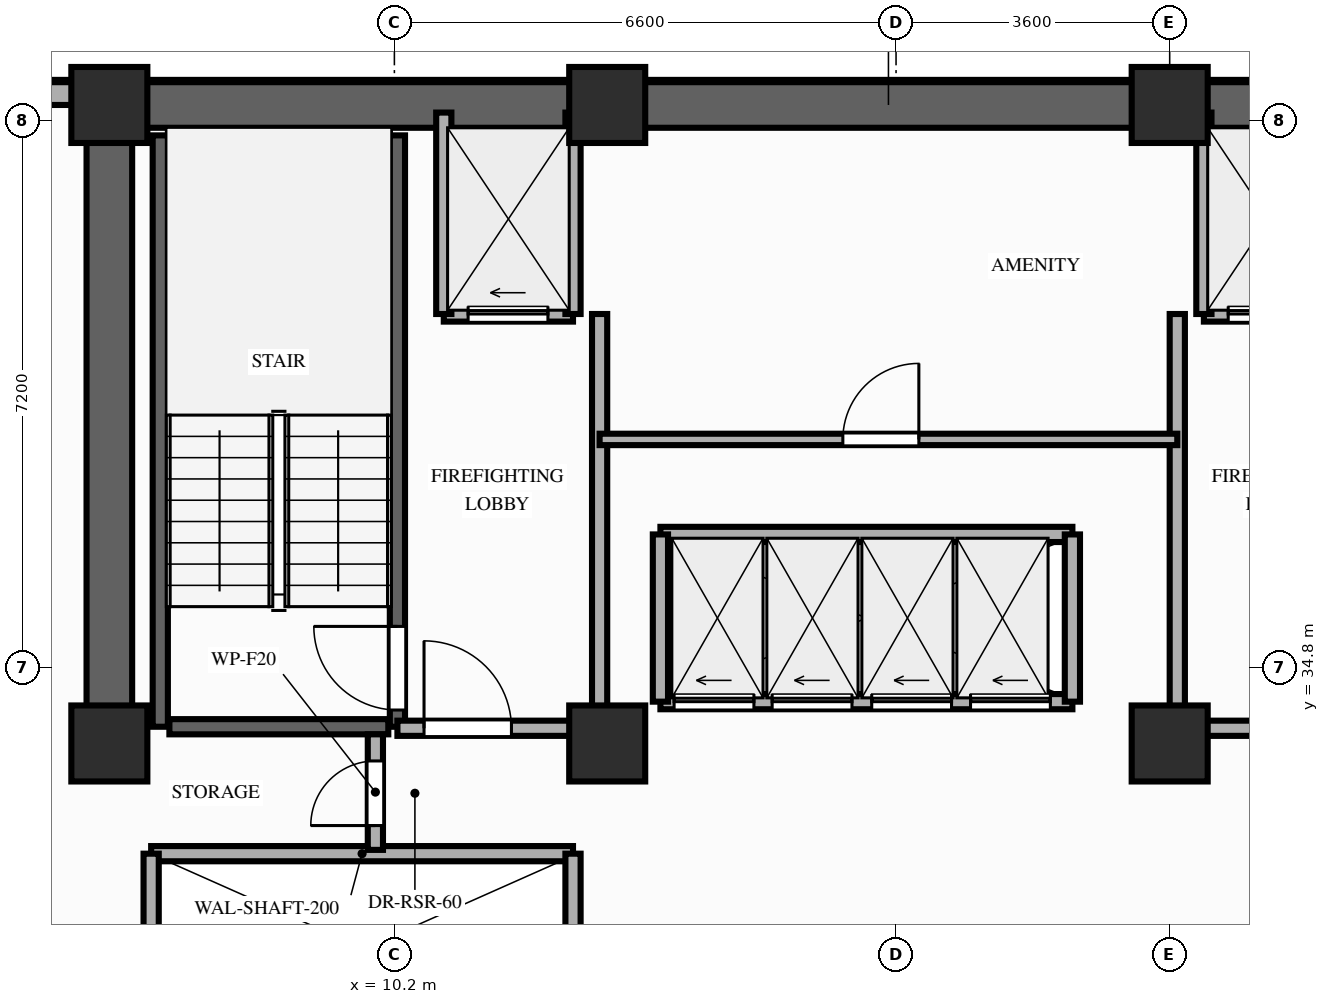
"""IFC4 building model, lengths in metres.
Left out: names, types, materials, properties, quantities, classifications, styles, units other than length and angle.
Written with IfcOpenShell. Run it as: python <this file> out.ifc"""

import sys

from ifc_helpers import new_model, si_unit, direction, frame, frame_2d, origin, origin_2d, place, context, subcontext, project, spatial, rectangle, extrude, element, fill, save


model = new_model("IFC4")
c1 = context("Model", 3, precision=1e-05, world=origin(), true_north=direction((0.0, 1.0)))
c2 = subcontext(c1, "Body", "Model", "MODEL_VIEW")
j1 = project(units=[si_unit("LENGTHUNIT", "METRE"), si_unit("PLANEANGLEUNIT", "RADIAN")], contexts=[c1])
p1 = place(None, origin())
s1 = spatial("IfcSite", under=j1, at=p1, CompositionType="ELEMENT")
p2 = place(p1, origin())
s2 = spatial("IfcBuilding", under=s1, at=p2, CompositionType="ELEMENT")
p3 = place(p2, frame((0.0, 0.0, 107.4)))
s3 = spatial("IfcBuildingStorey", under=s2, at=p3, CompositionType="ELEMENT", Elevation=107.4)
for number, where, z_axis, x_axis in (
    (1, (6.45, 33.8, 0.0), (0.0, 0.0, 1.0), (1.0, 0.0, 0.0)),
    (2, (13.0, 33.8, 0.0), (0.0, 0.0, 1.0), (1.0, 0.0, 0.0)),
    (3, (20.4, 33.8, 0.0), (0.0, 0.0, 1.0), (1.0, 0.0, 0.0)),
    (4, (6.45, 42.2, 0.0), (0.0, 0.0, 1.0), (1.0, 0.0, 0.0)),
    (5, (13.0, 42.2, 0.0), (0.0, 0.0, 1.0), (1.0, 0.0, 0.0)),
    (6, (20.4, 42.2, 0.0), (0.0, 0.0, 1.0), (1.0, 0.0, 0.0)),
):
    element("IfcColumn", number, at=place(p3, frame(where, z_axis=z_axis, x_axis=x_axis)), inside=s3, PredefinedType="COLUMN", context=c2, shape_type="SweptSolid", body=[
        extrude(rectangle(XDim=1.0, YDim=1.0, at=origin_2d()), origin(), (0.0, 0.0, 1.0), 3.2),
    ])
p4 = place(p3, frame((6.0, 42.35, 0.0), z_axis=(0.0, 0.0, 1.0), x_axis=(-1.0, 0.0, 0.0)))
e7 = element("IfcWall", 7, at=p4, inside=s3, PredefinedType="STANDARD", context=c2, shape_type="SweptSolid", body=[
    extrude(rectangle(XDim=2.0, YDim=0.3, at=frame_2d((1.0, 0.0))), origin(), (0.0, 0.0, 1.0), 3.02),
])
p5 = place(p3, frame((6.45, 42.2, 0.0), z_axis=(0.0, 0.0, 1.0), x_axis=(1.0, 0.0, 0.0)))
e8 = element("IfcWall", 8, at=p5, inside=s3, PredefinedType="SHEAR", context=c2, shape_type="SweptSolid", body=[
    extrude(rectangle(XDim=20.45, YDim=0.6, at=frame_2d((10.225, 0.0))), origin(), (0.0, 0.0, 1.0), 3.02),
])
p6 = place(p3, frame((6.45, 33.8, 0.0), z_axis=(0.0, 0.0, 1.0), x_axis=(0.0, 1.0, 0.0)))
e9 = element("IfcWall", 9, at=p6, inside=s3, PredefinedType="SHEAR", context=c2, shape_type="SweptSolid", body=[
    extrude(rectangle(XDim=7.95, YDim=0.6, at=frame_2d((3.975, 0.0))), origin(), (0.0, 0.0, 1.0), 3.02),
])
p7 = place(p3, frame((7.12, 34.02, 0.0), z_axis=(0.0, 0.0, 1.0), x_axis=(0.0, 1.0, 0.0)))
e10 = element("IfcWall", 10, at=p7, inside=s3, PredefinedType="SHEAR", context=c2, shape_type="SweptSolid", body=[
    extrude(rectangle(XDim=7.78, YDim=0.2, at=frame_2d((3.89, 0.0))), origin(), (0.0, 0.0, 1.0), 3.02),
])
p8 = place(p3, frame((10.24, 34.02, 0.0), z_axis=(0.0, 0.0, 1.0), x_axis=(0.0, 1.0, 0.0)))
e11 = element("IfcWall", 11, at=p8, inside=s3, PredefinedType="SHEAR", context=c2, shape_type="SweptSolid", body=[
    extrude(rectangle(XDim=7.78, YDim=0.2, at=frame_2d((3.89, 0.0))), origin(), (0.0, 0.0, 1.0), 3.02),
])
p9 = place(p8, frame((0.22, 0.0, 0.0)))
e12 = element("IfcOpeningElement", 12, at=p9, cuts=e11, PredefinedType="OPENING", context=c2, shape_type="SweptSolid", body=[
    extrude(rectangle(XDim=1.1, YDim=2.15, at=frame_2d((0.55, 1.075))), frame((0.0, 0.11, 0.0), z_axis=(0.0, -1.0, 0.0), x_axis=(1.0, 0.0, 0.0)), (0.0, 0.0, 1.0), 0.22),
])
p10 = place(p3, frame((7.24, 34.02, 0.0), z_axis=(0.0, 0.0, 1.0), x_axis=(1.0, 0.0, 0.0)))
e13 = element("IfcWall", 13, at=p10, inside=s3, PredefinedType="SHEAR", context=c2, shape_type="SweptSolid", body=[
    extrude(rectangle(XDim=2.88, YDim=0.2, at=frame_2d((1.44, 0.0))), origin(), (0.0, 0.0, 1.0), 3.02),
])
p11 = place(p3, frame((7.0, 32.35, 0.0), z_axis=(0.0, 0.0, 1.0), x_axis=(1.0, 0.0, 0.0)))
e14 = element("IfcWall", 14, at=p11, inside=s3, PredefinedType="MOVABLE", context=c2, shape_type="SweptSolid", body=[
    extrude(rectangle(XDim=5.55, YDim=0.2, at=frame_2d((2.775, 0.0))), origin(), (0.0, 0.0, 1.0), 3.02),
])
for number, where, z_axis, x_axis in (
    (15, (7.0, 29.85, 0.0), (0.0, 0.0, 1.0), (0.0, 1.0, 0.0)),
    (16, (12.55, 29.85, 0.0), (0.0, 0.0, 1.0), (0.0, 1.0, 0.0)),
):
    element("IfcWall", number, at=place(p3, frame(where, z_axis=z_axis, x_axis=x_axis)), inside=s3, PredefinedType="MOVABLE", context=c2, shape_type="SweptSolid", body=[
        extrude(rectangle(XDim=2.5, YDim=0.2, at=frame_2d((1.25, 0.0))), origin(), (0.0, 0.0, 1.0), 3.02),
    ])
p12 = place(p3, frame((10.85, 39.45, 0.0), z_axis=(0.0, 0.0, 1.0), x_axis=(1.0, 0.0, 0.0)))
e17 = element("IfcWall", 17, at=p12, inside=s3, PredefinedType="MOVABLE", context=c2, shape_type="SweptSolid", body=[
    extrude(rectangle(XDim=1.7, YDim=0.2, at=frame_2d((0.85, 0.0))), origin(), (0.0, 0.0, 1.0), 3.02),
])
p13 = place(p12, frame((0.32, 0.0, 0.0)))
e18 = element("IfcOpeningElement", 18, at=p13, cuts=e17, PredefinedType="OPENING", context=c2, shape_type="SweptSolid", body=[
    extrude(rectangle(XDim=1.05, YDim=2.15, at=frame_2d((0.525, 1.075))), frame((0.0, 0.11, 0.0), z_axis=(0.0, -1.0, 0.0), x_axis=(1.0, 0.0, 0.0)), (0.0, 0.0, 1.0), 0.22),
])
p14 = place(p3, frame((20.85, 39.45, 0.0), z_axis=(0.0, 0.0, 1.0), x_axis=(1.0, 0.0, 0.0)))
e19 = element("IfcWall", 19, at=p14, inside=s3, PredefinedType="MOVABLE", context=c2, shape_type="SweptSolid", body=[
    extrude(rectangle(XDim=1.7, YDim=0.2, at=frame_2d((0.85, 0.0))), origin(), (0.0, 0.0, 1.0), 3.02),
])
p15 = place(p14, frame((0.32, 0.0, 0.0)))
e20 = element("IfcOpeningElement", 20, at=p15, cuts=e19, PredefinedType="OPENING", context=c2, shape_type="SweptSolid", body=[
    extrude(rectangle(XDim=1.05, YDim=2.15, at=frame_2d((0.525, 1.075))), frame((0.0, 0.11, 0.0), z_axis=(0.0, -1.0, 0.0), x_axis=(1.0, 0.0, 0.0)), (0.0, 0.0, 1.0), 0.22),
])
for number, where, z_axis, x_axis in (
    (21, (10.85, 39.45, 0.0), (0.0, 0.0, 1.0), (0.0, 1.0, 0.0)),
    (22, (12.55, 39.45, 0.0), (0.0, 0.0, 1.0), (0.0, 1.0, 0.0)),
):
    element("IfcWall", number, at=place(p3, frame(where, z_axis=z_axis, x_axis=x_axis)), inside=s3, PredefinedType="MOVABLE", context=c2, shape_type="SweptSolid", body=[
        extrude(rectangle(XDim=2.65, YDim=0.2, at=frame_2d((1.325, 0.0))), origin(), (0.0, 0.0, 1.0), 2.41),
    ])
p16 = place(p3, frame((12.9, 34.0, 0.0), z_axis=(0.0, 0.0, 1.0), x_axis=(0.0, 1.0, 0.0)))
e23 = element("IfcWall", 23, at=p16, inside=s3, PredefinedType="PARTITIONING", context=c2, shape_type="SweptSolid", body=[
    extrude(rectangle(XDim=5.45, YDim=0.2, at=frame_2d((2.725, 0.0))), origin(), (0.0, 0.0, 1.0), 2.41),
])
p17 = place(p3, frame((10.24, 34.0, 0.0), z_axis=(0.0, 0.0, 1.0), x_axis=(1.0, 0.0, 0.0)))
e24 = element("IfcWall", 24, at=p17, inside=s3, PredefinedType="PARTITIONING", context=c2, shape_type="SweptSolid", body=[
    extrude(rectangle(XDim=2.66, YDim=0.2, at=frame_2d((1.33, 0.0))), origin(), (0.0, 0.0, 1.0), 2.41),
])
p18 = place(p17, frame((0.35, 0.0, 0.0)))
e25 = element("IfcOpeningElement", 25, at=p18, cuts=e24, PredefinedType="OPENING", context=c2, shape_type="SweptSolid", body=[
    extrude(rectangle(XDim=1.15, YDim=2.15, at=frame_2d((0.575, 1.075))), frame((0.0, 0.11, 0.0), z_axis=(0.0, -1.0, 0.0), x_axis=(1.0, 0.0, 0.0)), (0.0, 0.0, 1.0), 0.22),
])
p19 = place(p3, frame((20.85, 39.45, 0.0), z_axis=(0.0, 0.0, 1.0), x_axis=(0.0, 1.0, 0.0)))
e26 = element("IfcWall", 26, at=p19, inside=s3, PredefinedType="MOVABLE", context=c2, shape_type="SweptSolid", body=[
    extrude(rectangle(XDim=2.65, YDim=0.2, at=frame_2d((1.325, 0.0))), origin(), (0.0, 0.0, 1.0), 2.41),
])
p20 = place(p3, frame((20.5, 34.0, 0.0), z_axis=(0.0, 0.0, 1.0), x_axis=(0.0, 1.0, 0.0)))
e27 = element("IfcWall", 27, at=p20, inside=s3, PredefinedType="PARTITIONING", context=c2, shape_type="SweptSolid", body=[
    extrude(rectangle(XDim=5.45, YDim=0.2, at=frame_2d((2.725, 0.0))), origin(), (0.0, 0.0, 1.0), 2.41),
])
p21 = place(p3, frame((20.5, 34.0, 0.0), z_axis=(0.0, 0.0, 1.0), x_axis=(1.0, 0.0, 0.0)))
e28 = element("IfcWall", 28, at=p21, inside=s3, PredefinedType="PARTITIONING", context=c2, shape_type="SweptSolid", body=[
    extrude(rectangle(XDim=2.6, YDim=0.2, at=frame_2d((1.3, 0.0))), origin(), (0.0, 0.0, 1.0), 2.41),
])
p22 = place(p21, frame((1.05, 0.0, 0.0)))
e29 = element("IfcOpeningElement", 29, at=p22, cuts=e28, PredefinedType="OPENING", context=c2, shape_type="SweptSolid", body=[
    extrude(rectangle(XDim=1.15, YDim=2.15, at=frame_2d((0.575, 1.075))), frame((0.0, 0.11, 0.0), z_axis=(0.0, -1.0, 0.0), x_axis=(1.0, 0.0, 0.0)), (0.0, 0.0, 1.0), 0.22),
])
p23 = place(p3, frame((9.95, 32.4, 0.0), z_axis=(0.0, 0.0, 1.0), x_axis=(0.0, 1.0, 0.0)))
e30 = element("IfcWall", 30, at=p23, inside=s3, PredefinedType="PARTITIONING", context=c2, shape_type="SweptSolid", body=[
    extrude(rectangle(XDim=1.52, YDim=0.2, at=frame_2d((0.76, 0.0))), origin(), (0.0, 0.0, 1.0), 2.41),
])
p24 = place(p23, frame((0.32, 0.0, 0.0)))
e31 = element("IfcOpeningElement", 31, at=p24, cuts=e30, PredefinedType="OPENING", context=c2, shape_type="SweptSolid", body=[
    extrude(rectangle(XDim=0.85, YDim=2.05, at=frame_2d((0.425, 1.025))), frame((0.0, 0.11, 0.0), z_axis=(0.0, -1.0, 0.0), x_axis=(1.0, 0.0, 0.0)), (0.0, 0.0, 1.0), 0.22),
])
p25 = place(p3, frame((12.9, 37.8, 0.0), z_axis=(0.0, 0.0, 1.0), x_axis=(1.0, 0.0, 0.0)))
e32 = element("IfcWall", 32, at=p25, inside=s3, PredefinedType="PARTITIONING", context=c2, shape_type="SweptSolid", body=[
    extrude(rectangle(XDim=7.6, YDim=0.15, at=frame_2d((3.8, 0.0))), origin(), (0.0, 0.0, 1.0), 3.02),
])
p26 = place(p25, frame((3.2, 0.0, 0.0)))
e33 = element("IfcOpeningElement", 33, at=p26, cuts=e32, PredefinedType="OPENING", context=c2, shape_type="SweptSolid", body=[
    extrude(rectangle(XDim=1.0, YDim=2.15, at=frame_2d((0.5, 1.075))), frame((0.0, 0.085, 0.0), z_axis=(0.0, -1.0, 0.0), x_axis=(1.0, 0.0, 0.0)), (0.0, 0.0, 1.0), 0.17),
])
p27 = place(p3, frame((13.7, 34.35, 0.0), z_axis=(0.0, 0.0, 1.0), x_axis=(1.0, 0.0, 0.0)))
e34 = element("IfcWall", 34, at=p27, inside=s3, PredefinedType="MOVABLE", context=c2, shape_type="SweptSolid", body=[
    extrude(rectangle(XDim=5.42, YDim=0.2, at=frame_2d((2.71, 0.0))), origin(), (0.0, 0.0, 1.0), 3.02),
])
p28 = place(p27, frame((0.18, 0.0, 0.0)))
e35 = element("IfcOpeningElement", 35, at=p28, cuts=e34, PredefinedType="OPENING", context=c2, shape_type="SweptSolid", body=[
    extrude(rectangle(XDim=1.05, YDim=2.15, at=frame_2d((0.525, 1.075))), frame((0.0, 0.11, 0.0), z_axis=(0.0, -1.0, 0.0), x_axis=(1.0, 0.0, 0.0)), (0.0, 0.0, 1.0), 0.22),
])
p29 = place(p27, frame((1.47, 0.0, 0.0)))
e36 = element("IfcOpeningElement", 36, at=p29, cuts=e34, PredefinedType="OPENING", context=c2, shape_type="SweptSolid", body=[
    extrude(rectangle(XDim=1.05, YDim=2.15, at=frame_2d((0.525, 1.075))), frame((0.0, 0.11, 0.0), z_axis=(0.0, -1.0, 0.0), x_axis=(1.0, 0.0, 0.0)), (0.0, 0.0, 1.0), 0.22),
])
p30 = place(p27, frame((2.78, 0.0, 0.0)))
e37 = element("IfcOpeningElement", 37, at=p30, cuts=e34, PredefinedType="OPENING", context=c2, shape_type="SweptSolid", body=[
    extrude(rectangle(XDim=1.05, YDim=2.15, at=frame_2d((0.525, 1.075))), frame((0.0, 0.11, 0.0), z_axis=(0.0, -1.0, 0.0), x_axis=(1.0, 0.0, 0.0)), (0.0, 0.0, 1.0), 0.22),
])
p31 = place(p27, frame((4.08, 0.0, 0.0)))
e38 = element("IfcOpeningElement", 38, at=p31, cuts=e34, PredefinedType="OPENING", context=c2, shape_type="SweptSolid", body=[
    extrude(rectangle(XDim=1.05, YDim=2.15, at=frame_2d((0.525, 1.075))), frame((0.0, 0.11, 0.0), z_axis=(0.0, -1.0, 0.0), x_axis=(1.0, 0.0, 0.0)), (0.0, 0.0, 1.0), 0.22),
])
p32 = place(p3, frame((13.7, 36.55, 0.0), z_axis=(0.0, 0.0, 1.0), x_axis=(1.0, 0.0, 0.0)))
e39 = element("IfcWall", 39, at=p32, inside=s3, PredefinedType="MOVABLE", context=c2, shape_type="SweptSolid", body=[
    extrude(rectangle(XDim=5.42, YDim=0.2, at=frame_2d((2.71, 0.0))), origin(), (0.0, 0.0, 1.0), 3.02),
])
for number, where, z_axis, x_axis in (
    (40, (13.7, 34.35, 0.0), (0.0, 0.0, 1.0), (0.0, 1.0, 0.0)),
    (41, (19.12, 34.35, 0.0), (0.0, 0.0, 1.0), (0.0, 1.0, 0.0)),
):
    element("IfcWall", number, at=place(p3, frame(where, z_axis=z_axis, x_axis=x_axis)), inside=s3, PredefinedType="MOVABLE", context=c2, shape_type="SweptSolid", body=[
        extrude(rectangle(XDim=2.2, YDim=0.2, at=frame_2d((1.1, 0.0))), origin(), (0.0, 0.0, 1.0), 3.02),
    ])
p33 = place(p9, origin())
e42 = element("IfcDoor", 42, at=p33, inside=s3, OperationType="SINGLE_SWING_RIGHT", PredefinedType="DOOR", context=c2, shape_type="SweptSolid", body=[
    extrude(rectangle(XDim=1.1, YDim=2.15, at=frame_2d((0.55, 1.075))), frame((0.0, 0.025, 0.0), z_axis=(0.0, -1.0, 0.0), x_axis=(1.0, 0.0, 0.0)), (0.0, 0.0, 1.0), 0.05),
])
fill(e12, e42)
p34 = place(p13, origin())
e43 = element("IfcDoor", 43, at=p34, inside=s3, OperationType="SLIDING_TO_LEFT", PredefinedType="DOOR", context=c2, shape_type="SweptSolid", body=[
    extrude(rectangle(XDim=1.05, YDim=2.15, at=frame_2d((0.525, 1.075))), frame((0.0, 0.025, 0.0), z_axis=(0.0, -1.0, 0.0), x_axis=(1.0, 0.0, 0.0)), (0.0, 0.0, 1.0), 0.05),
])
fill(e18, e43)
p35 = place(p15, origin())
e44 = element("IfcDoor", 44, at=p35, inside=s3, OperationType="SLIDING_TO_LEFT", PredefinedType="DOOR", context=c2, shape_type="SweptSolid", body=[
    extrude(rectangle(XDim=1.05, YDim=2.15, at=frame_2d((0.525, 1.075))), frame((0.0, 0.025, 0.0), z_axis=(0.0, -1.0, 0.0), x_axis=(1.0, 0.0, 0.0)), (0.0, 0.0, 1.0), 0.05),
])
fill(e20, e44)
p36 = place(p18, origin())
e45 = element("IfcDoor", 45, at=p36, inside=s3, OperationType="SINGLE_SWING_LEFT", PredefinedType="DOOR", context=c2, shape_type="SweptSolid", body=[
    extrude(rectangle(XDim=1.15, YDim=2.15, at=frame_2d((0.575, 1.075))), frame((0.0, 0.025, 0.0), z_axis=(0.0, -1.0, 0.0), x_axis=(1.0, 0.0, 0.0)), (0.0, 0.0, 1.0), 0.05),
])
fill(e25, e45)
p37 = place(p24, origin())
e46 = element("IfcDoor", 46, at=p37, inside=s3, OperationType="SINGLE_SWING_LEFT", PredefinedType="DOOR", context=c2, shape_type="SweptSolid", body=[
    extrude(rectangle(XDim=0.85, YDim=2.05, at=frame_2d((0.425, 1.025))), frame((0.0, 0.025, 0.0), z_axis=(0.0, -1.0, 0.0), x_axis=(1.0, 0.0, 0.0)), (0.0, 0.0, 1.0), 0.05),
])
fill(e31, e46)
p38 = place(p26, origin())
e47 = element("IfcDoor", 47, at=p38, inside=s3, OperationType="SINGLE_SWING_RIGHT", PredefinedType="DOOR", context=c2, shape_type="SweptSolid", body=[
    extrude(rectangle(XDim=1.0, YDim=2.15, at=frame_2d((0.5, 1.075))), frame((0.0, 0.025, 0.0), z_axis=(0.0, -1.0, 0.0), x_axis=(1.0, 0.0, 0.0)), (0.0, 0.0, 1.0), 0.05),
])
fill(e33, e47)
p39 = place(p28, origin())
e48 = element("IfcDoor", 48, at=p39, inside=s3, OperationType="SLIDING_TO_LEFT", PredefinedType="DOOR", context=c2, shape_type="SweptSolid", body=[
    extrude(rectangle(XDim=1.05, YDim=2.15, at=frame_2d((0.525, 1.075))), frame((0.0, 0.025, 0.0), z_axis=(0.0, -1.0, 0.0), x_axis=(1.0, 0.0, 0.0)), (0.0, 0.0, 1.0), 0.05),
])
fill(e35, e48)
p40 = place(p29, origin())
e49 = element("IfcDoor", 49, at=p40, inside=s3, OperationType="SLIDING_TO_LEFT", PredefinedType="DOOR", context=c2, shape_type="SweptSolid", body=[
    extrude(rectangle(XDim=1.05, YDim=2.15, at=frame_2d((0.525, 1.075))), frame((0.0, 0.025, 0.0), z_axis=(0.0, -1.0, 0.0), x_axis=(1.0, 0.0, 0.0)), (0.0, 0.0, 1.0), 0.05),
])
fill(e36, e49)
p41 = place(p30, origin())
e50 = element("IfcDoor", 50, at=p41, inside=s3, OperationType="SLIDING_TO_LEFT", PredefinedType="DOOR", context=c2, shape_type="SweptSolid", body=[
    extrude(rectangle(XDim=1.05, YDim=2.15, at=frame_2d((0.525, 1.075))), frame((0.0, 0.025, 0.0), z_axis=(0.0, -1.0, 0.0), x_axis=(1.0, 0.0, 0.0)), (0.0, 0.0, 1.0), 0.05),
])
fill(e37, e50)
p42 = place(p31, origin())
e51 = element("IfcDoor", 51, at=p42, inside=s3, OperationType="SLIDING_TO_LEFT", PredefinedType="DOOR", context=c2, shape_type="SweptSolid", body=[
    extrude(rectangle(XDim=1.05, YDim=2.15, at=frame_2d((0.525, 1.075))), frame((0.0, 0.025, 0.0), z_axis=(0.0, -1.0, 0.0), x_axis=(1.0, 0.0, 0.0)), (0.0, 0.0, 1.0), 0.05),
])
fill(e38, e51)
save(model, sys.argv[1])
